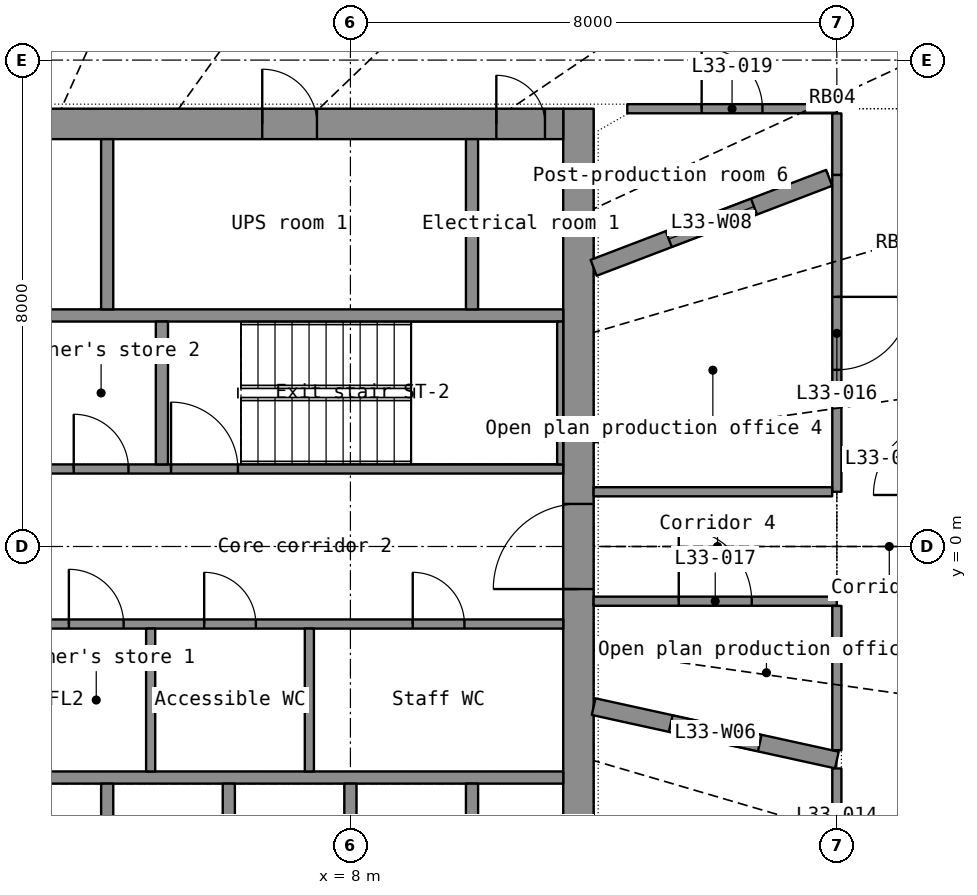
"""IFC4 building model, lengths in metres.
Left out: names, types, materials, properties, quantities, classifications, styles, units other than length and angle.
Written with IfcOpenShell. Run it as: python <this file> out.ifc"""

import sys

from ifc_helpers import new_model, si_unit, direction, frame, frame_2d, origin, place, context, subcontext, project, spatial, rectangle, extrude, element, fill, save


model = new_model("IFC4")
c1 = context("Model", 3, precision=1e-05, world=origin(), true_north=direction((0.0, 1.0)))
c2 = subcontext(c1, "Body", "Model", "MODEL_VIEW")
j1 = project(units=[si_unit("LENGTHUNIT", "METRE"), si_unit("PLANEANGLEUNIT", "RADIAN")], contexts=[c1])
p1 = place(None, origin())
s1 = spatial("IfcSite", under=j1, at=p1, CompositionType="ELEMENT")
p2 = place(p1, origin())
s2 = spatial("IfcBuilding", under=s1, at=p2, CompositionType="ELEMENT")
p3 = place(p2, frame((0.0, 0.0, 137.8)))
s3 = spatial("IfcBuildingStorey", under=s2, at=p3, CompositionType="ELEMENT", Elevation=137.8)
p4 = place(p3, frame((11.75, -7.2, 0.0), z_axis=(0.0, 0.0, 1.0), x_axis=(0.0, 1.0, 0.0)))
e1 = element("IfcWall", 1, at=p4, inside=s3, PredefinedType="SHEAR", context=c2, shape_type="SweptSolid", body=[
    extrude(rectangle(XDim=14.4, YDim=0.5, at=frame_2d((7.2, 0.0))), origin(), (0.0, 0.0, 1.0), 3.3),
])
p5 = place(p4, frame((6.5, 0.0, 0.0)))
e2 = element("IfcOpeningElement", 2, at=p5, cuts=e1, PredefinedType="OPENING", context=c2, shape_type="SweptSolid", body=[
    extrude(rectangle(XDim=1.4, YDim=2.2, at=frame_2d((0.7, 1.1))), frame((0.0, 0.26, 0.0), z_axis=(0.0, -1.0, 0.0), x_axis=(1.0, 0.0, 0.0)), (0.0, 0.0, 1.0), 0.52),
])
p6 = place(p3, frame((-11.5, 6.95, 0.0), z_axis=(0.0, 0.0, 1.0), x_axis=(1.0, 0.0, 0.0)))
e3 = element("IfcWall", 3, at=p6, inside=s3, PredefinedType="SHEAR", context=c2, shape_type="SweptSolid", body=[
    extrude(rectangle(XDim=23.0, YDim=0.5, at=frame_2d((11.5, 0.0))), origin(), (0.0, 0.0, 1.0), 3.3),
])
p7 = place(p6, frame((1.95, 0.0, 0.0)))
e4 = element("IfcOpeningElement", 4, at=p7, cuts=e3, PredefinedType="OPENING", context=c2, shape_type="SweptSolid", body=[
    extrude(rectangle(XDim=1.1, YDim=2.2, at=frame_2d((0.55, 1.1))), frame((0.0, 0.26, 0.0), z_axis=(0.0, -1.0, 0.0), x_axis=(1.0, 0.0, 0.0)), (0.0, 0.0, 1.0), 0.52),
])
p8 = place(p6, frame((10.05, 0.0, 0.0)))
e5 = element("IfcOpeningElement", 5, at=p8, cuts=e3, PredefinedType="OPENING", context=c2, shape_type="SweptSolid", body=[
    extrude(rectangle(XDim=0.9, YDim=2.1, at=frame_2d((0.45, 1.05))), frame((0.0, 0.26, 0.0), z_axis=(0.0, -1.0, 0.0), x_axis=(1.0, 0.0, 0.0)), (0.0, 0.0, 1.0), 0.52),
])
p9 = place(p6, frame((18.05, 0.0, 0.0)))
e6 = element("IfcOpeningElement", 6, at=p9, cuts=e3, PredefinedType="OPENING", context=c2, shape_type="SweptSolid", body=[
    extrude(rectangle(XDim=0.9, YDim=2.1, at=frame_2d((0.45, 1.05))), frame((0.0, 0.26, 0.0), z_axis=(0.0, -1.0, 0.0), x_axis=(1.0, 0.0, 0.0)), (0.0, 0.0, 1.0), 0.52),
])
p10 = place(p6, frame((0.3, 0.0, 0.0)))
e7 = element("IfcOpeningElement", 7, at=p10, cuts=e3, PredefinedType="OPENING", context=c2, shape_type="SweptSolid", body=[
    extrude(rectangle(XDim=0.8, YDim=2.05, at=frame_2d((0.4, 1.025))), frame((0.0, 0.26, 0.0), z_axis=(0.0, -1.0, 0.0), x_axis=(1.0, 0.0, 0.0)), (0.0, 0.0, 1.0), 0.52),
])
p11 = place(p6, frame((21.9, 0.0, 0.0)))
e8 = element("IfcOpeningElement", 8, at=p11, cuts=e3, PredefinedType="OPENING", context=c2, shape_type="SweptSolid", body=[
    extrude(rectangle(XDim=0.8, YDim=2.05, at=frame_2d((0.4, 1.025))), frame((0.0, 0.26, 0.0), z_axis=(0.0, -1.0, 0.0), x_axis=(1.0, 0.0, 0.0)), (0.0, 0.0, 1.0), 0.52),
])
for number, where, z_axis, x_axis in (
    (9, (-11.5, -3.8, 0.0), (0.0, 0.0, 1.0), (1.0, 0.0, 0.0)),
    (10, (-11.5, 3.8, 0.0), (0.0, 0.0, 1.0), (1.0, 0.0, 0.0)),
):
    element("IfcWall", number, at=place(p3, frame(where, z_axis=z_axis, x_axis=x_axis)), inside=s3, PredefinedType="SHEAR", context=c2, shape_type="SweptSolid", body=[
        extrude(rectangle(XDim=23.0, YDim=0.2, at=frame_2d((11.5, 0.0))), origin(), (0.0, 0.0, 1.0), 3.3),
    ])
for number, where, z_axis, x_axis in (
    (11, (4.0, -6.7, 0.0), (0.0, 0.0, 1.0), (0.0, 1.0, 0.0)),
    (12, (6.0, -6.7, 0.0), (0.0, 0.0, 1.0), (0.0, 1.0, 0.0)),
    (13, (8.0, -6.7, 0.0), (0.0, 0.0, 1.0), (0.0, 1.0, 0.0)),
    (14, (10.0, -6.7, 0.0), (0.0, 0.0, 1.0), (0.0, 1.0, 0.0)),
    (15, (10.0, 3.9, 0.0), (0.0, 0.0, 1.0), (0.0, 1.0, 0.0)),
):
    element("IfcWall", number, at=place(p3, frame(where, z_axis=z_axis, x_axis=x_axis)), inside=s3, PredefinedType="SHEAR", context=c2, shape_type="SweptSolid", body=[
        extrude(rectangle(XDim=2.8, YDim=0.2, at=frame_2d((1.4, 0.0))), origin(), (0.0, 0.0, 1.0), 3.3),
    ])
p12 = place(p3, frame((4.0, 3.9, 0.0), z_axis=(0.0, 0.0, 1.0), x_axis=(0.0, 1.0, 0.0)))
e16 = element("IfcWall", 16, at=p12, inside=s3, PredefinedType="PARTITIONING", context=c2, shape_type="SweptSolid", body=[
    extrude(rectangle(XDim=2.8, YDim=0.2, at=frame_2d((1.4, 0.0))), origin(), (0.0, 0.0, 1.0), 3.3),
])
p13 = place(p3, frame((3.0, -1.275, 0.0), z_axis=(0.0, 0.0, 1.0), x_axis=(1.0, 0.0, 0.0)))
e17 = element("IfcWall", 17, at=p13, inside=s3, PredefinedType="PARTITIONING", context=c2, shape_type="SweptSolid", body=[
    extrude(rectangle(XDim=8.5, YDim=0.15, at=frame_2d((4.25, 0.0))), origin(), (0.0, 0.0, 1.0), 3.3),
])
p14 = place(p13, frame((0.37, 0.0, 0.0)))
e18 = element("IfcOpeningElement", 18, at=p14, cuts=e17, PredefinedType="OPENING", context=c2, shape_type="SweptSolid", body=[
    extrude(rectangle(XDim=0.9, YDim=2.1, at=frame_2d((0.45, 1.05))), frame((0.0, 0.085, 0.0), z_axis=(0.0, -1.0, 0.0), x_axis=(1.0, 0.0, 0.0)), (0.0, 0.0, 1.0), 0.17),
])
p15 = place(p13, frame((2.595, 0.0, 0.0)))
e19 = element("IfcOpeningElement", 19, at=p15, cuts=e17, PredefinedType="OPENING", context=c2, shape_type="SweptSolid", body=[
    extrude(rectangle(XDim=0.85, YDim=2.1, at=frame_2d((0.425, 1.05))), frame((0.0, 0.085, 0.0), z_axis=(0.0, -1.0, 0.0), x_axis=(1.0, 0.0, 0.0)), (0.0, 0.0, 1.0), 0.17),
])
p16 = place(p13, frame((6.025, 0.0, 0.0)))
e20 = element("IfcOpeningElement", 20, at=p16, cuts=e17, PredefinedType="OPENING", context=c2, shape_type="SweptSolid", body=[
    extrude(rectangle(XDim=0.85, YDim=2.1, at=frame_2d((0.425, 1.05))), frame((0.0, 0.085, 0.0), z_axis=(0.0, -1.0, 0.0), x_axis=(1.0, 0.0, 0.0)), (0.0, 0.0, 1.0), 0.17),
])
p17 = place(p3, frame((3.0, 1.275, 0.0), z_axis=(0.0, 0.0, 1.0), x_axis=(1.0, 0.0, 0.0)))
e21 = element("IfcWall", 21, at=p17, inside=s3, PredefinedType="SHEAR", context=c2, shape_type="SweptSolid", body=[
    extrude(rectangle(XDim=8.5, YDim=0.15, at=frame_2d((4.25, 0.0))), origin(), (0.0, 0.0, 1.0), 3.3),
])
p18 = place(p17, frame((2.05, 0.0, 0.0)))
e22 = element("IfcOpeningElement", 22, at=p18, cuts=e21, PredefinedType="OPENING", context=c2, shape_type="SweptSolid", body=[
    extrude(rectangle(XDim=1.1, YDim=2.15, at=frame_2d((0.55, 1.075))), frame((0.0, 0.085, 0.0), z_axis=(0.0, -1.0, 0.0), x_axis=(1.0, 0.0, 0.0)), (0.0, 0.0, 1.0), 0.17),
])
p19 = place(p17, frame((0.45, 0.0, 0.0)))
e23 = element("IfcOpeningElement", 23, at=p19, cuts=e21, PredefinedType="OPENING", context=c2, shape_type="SweptSolid", body=[
    extrude(rectangle(XDim=0.9, YDim=2.1, at=frame_2d((0.45, 1.05))), frame((0.0, 0.085, 0.0), z_axis=(0.0, -1.0, 0.0), x_axis=(1.0, 0.0, 0.0)), (0.0, 0.0, 1.0), 0.17),
])
p20 = place(p3, frame((11.45, 1.35, 0.0), z_axis=(0.0, 0.0, 1.0), x_axis=(0.0, 1.0, 0.0)))
e24 = element("IfcWall", 24, at=p20, inside=s3, PredefinedType="SHEAR", context=c2, shape_type="SweptSolid", body=[
    extrude(rectangle(XDim=2.35, YDim=0.1, at=frame_2d((1.175, 0.0))), origin(), (0.0, 0.0, 1.0), 3.3),
])
p21 = place(p3, frame((4.9, 1.35, 0.0), z_axis=(0.0, 0.0, 1.0), x_axis=(0.0, 1.0, 0.0)))
e25 = element("IfcWall", 25, at=p21, inside=s3, PredefinedType="SHEAR", context=c2, shape_type="SweptSolid", body=[
    extrude(rectangle(XDim=2.35, YDim=0.2, at=frame_2d((1.175, 0.0))), origin(), (0.0, 0.0, 1.0), 3.3),
])
for number, where, z_axis, x_axis in (
    (26, (4.715, -3.7, 0.0), (0.0, 0.0, 1.0), (0.0, 1.0, 0.0)),
    (27, (7.325, -3.7, 0.0), (0.0, 0.0, 1.0), (0.0, 1.0, 0.0)),
):
    element("IfcWall", number, at=place(p3, frame(where, z_axis=z_axis, x_axis=x_axis)), inside=s3, PredefinedType="PARTITIONING", context=c2, shape_type="SweptSolid", body=[
        extrude(rectangle(XDim=2.35, YDim=0.15, at=frame_2d((1.175, 0.0))), origin(), (0.0, 0.0, 1.0), 3.3),
    ])
p22 = place(p3, frame((16.0, 6.111, 0.0), z_axis=(0.0, 0.0, 1.0), x_axis=(0.0, -1.0, 0.0)))
e28 = element("IfcWall", 28, at=p22, inside=s3, PredefinedType="PARTITIONING", context=c2, shape_type="SweptSolid", body=[
    extrude(rectangle(XDim=5.211, YDim=0.15, at=frame_2d((2.606, 0.0))), origin(), (0.0, 0.0, 1.0), 2.4),
])
p23 = place(p22, frame((2.006, 0.0, 0.0)))
e29 = element("IfcOpeningElement", 29, at=p23, cuts=e28, PredefinedType="OPENING", context=c2, shape_type="SweptSolid", body=[
    extrude(rectangle(XDim=1.2, YDim=2.2, at=frame_2d((0.6, 1.1))), frame((0.0, 0.085, 0.0), z_axis=(0.0, -1.0, 0.0), x_axis=(1.0, 0.0, 0.0)), (0.0, 0.0, 1.0), 0.17),
])
p24 = place(p3, frame((15.873, 6.063, 0.0), z_axis=(0.0, 0.0, 1.0), x_axis=(-0.934170215, -0.356827703, 0.0)))
e30 = element("IfcWall", 30, at=p24, inside=s3, PredefinedType="PARTITIONING", context=c2, shape_type="SweptSolid", body=[
    extrude(rectangle(XDim=4.146, YDim=0.28, at=frame_2d((2.073, 0.0))), origin(), (0.0, 0.0, 1.0), 2.4),
])
p25 = place(p24, frame((1.323, 0.0, 1.0)))
e31 = element("IfcOpeningElement", 31, at=p25, cuts=e30, PredefinedType="OPENING", context=c2, shape_type="SweptSolid", body=[
    extrude(rectangle(XDim=1.5, YDim=1.2, at=frame_2d((0.75, 0.6))), frame((0.0, 0.15, 0.0), z_axis=(0.0, -1.0, 0.0), x_axis=(1.0, 0.0, 0.0)), (0.0, 0.0, 1.0), 0.3),
])
p26 = place(p3, frame((16.0, -3.512, 0.0), z_axis=(0.0, 0.0, 1.0), x_axis=(-0.976750433, 0.214379551, 0.0)))
e32 = element("IfcWall", 32, at=p26, inside=s3, PredefinedType="PARTITIONING", context=c2, shape_type="SweptSolid", body=[
    extrude(rectangle(XDim=4.095, YDim=0.28, at=frame_2d((2.048, 0.0))), origin(), (0.0, 0.0, 1.0), 2.4),
])
p27 = place(p26, frame((1.298, 0.0, 1.0)))
e33 = element("IfcOpeningElement", 33, at=p27, cuts=e32, PredefinedType="OPENING", context=c2, shape_type="SweptSolid", body=[
    extrude(rectangle(XDim=1.5, YDim=1.2, at=frame_2d((0.75, 0.6))), frame((0.0, 0.15, 0.0), z_axis=(0.0, -1.0, 0.0), x_axis=(1.0, 0.0, 0.0)), (0.0, 0.0, 1.0), 0.3),
])
p28 = place(p3, frame((12.0, -0.9, 0.0), z_axis=(0.0, 0.0, 1.0), x_axis=(1.0, 0.0, 0.0)))
e34 = element("IfcWall", 34, at=p28, inside=s3, PredefinedType="PARTITIONING", context=c2, shape_type="SweptSolid", body=[
    extrude(rectangle(XDim=4.0, YDim=0.15, at=frame_2d((2.0, 0.0))), origin(), (0.0, 0.0, 1.0), 2.4),
])
p29 = place(p28, frame((1.4, 0.0, 0.0)))
e35 = element("IfcOpeningElement", 35, at=p29, cuts=e34, PredefinedType="OPENING", context=c2, shape_type="SweptSolid", body=[
    extrude(rectangle(XDim=1.2, YDim=2.2, at=frame_2d((0.6, 1.1))), frame((0.0, 0.085, 0.0), z_axis=(0.0, -1.0, 0.0), x_axis=(1.0, 0.0, 0.0)), (0.0, 0.0, 1.0), 0.17),
])
p30 = place(p3, frame((15.923, 0.9, 0.0), z_axis=(0.0, 0.0, 1.0), x_axis=(-1.0, 0.0, 0.0)))
e36 = element("IfcWall", 36, at=p30, inside=s3, PredefinedType="PARTITIONING", context=c2, shape_type="SweptSolid", body=[
    extrude(rectangle(XDim=3.923, YDim=0.15, at=frame_2d((1.961, 0.0))), origin(), (0.0, 0.0, 1.0), 2.4),
])
p31 = place(p3, frame((16.0, -3.65, 0.0), z_axis=(0.0, 0.0, 1.0), x_axis=(0.0, -1.0, 0.0)))
e37 = element("IfcWall", 37, at=p31, inside=s3, PredefinedType="PARTITIONING", context=c2, shape_type="SweptSolid", body=[
    extrude(rectangle(XDim=3.55, YDim=0.15, at=frame_2d((1.775, 0.0))), origin(), (0.0, 0.0, 1.0), 2.4),
])
p32 = place(p31, frame((1.275, 0.0, 0.0)))
e38 = element("IfcOpeningElement", 38, at=p32, cuts=e37, PredefinedType="OPENING", context=c2, shape_type="SweptSolid", body=[
    extrude(rectangle(XDim=1.0, YDim=2.2, at=frame_2d((0.5, 1.1))), frame((0.0, 0.085, 0.0), z_axis=(0.0, -1.0, 0.0), x_axis=(1.0, 0.0, 0.0)), (0.0, 0.0, 1.0), 0.17),
])
p33 = place(p3, frame((12.553, 7.2, 0.0), z_axis=(0.0, 0.0, 1.0), x_axis=(1.0, 0.0, 0.0)))
e39 = element("IfcWall", 39, at=p33, inside=s3, PredefinedType="PARTITIONING", context=c2, shape_type="SweptSolid", body=[
    extrude(rectangle(XDim=3.447, YDim=0.15, at=frame_2d((1.723, 0.0))), origin(), (0.0, 0.0, 1.0), 2.4),
])
p34 = place(p33, frame((1.223, 0.0, 0.0)))
e40 = element("IfcOpeningElement", 40, at=p34, cuts=e39, PredefinedType="OPENING", context=c2, shape_type="SweptSolid", body=[
    extrude(rectangle(XDim=1.0, YDim=2.2, at=frame_2d((0.5, 1.1))), frame((0.0, 0.085, 0.0), z_axis=(0.0, -1.0, 0.0), x_axis=(1.0, 0.0, 0.0)), (0.0, 0.0, 1.0), 0.17),
])
p35 = place(p3, frame((16.0, -0.977, 0.0), z_axis=(0.0, 0.0, 1.0), x_axis=(0.0, -1.0, 0.0)))
e41 = element("IfcWall", 41, at=p35, inside=s3, PredefinedType="PARTITIONING", context=c2, shape_type="SweptSolid", body=[
    extrude(rectangle(XDim=2.373, YDim=0.15, at=frame_2d((1.187, 0.0))), origin(), (0.0, 0.0, 1.0), 2.4),
])
p36 = place(p3, frame((16.0, 7.123, 0.0), z_axis=(0.0, 0.0, 1.0), x_axis=(0.0, -1.0, 0.0)))
e42 = element("IfcWall", 42, at=p36, inside=s3, PredefinedType="PARTITIONING", context=c2, shape_type="SweptSolid", body=[
    extrude(rectangle(XDim=1.011, YDim=0.15, at=frame_2d((0.505, 0.0))), origin(), (0.0, 0.0, 1.0), 2.4),
])
p37 = place(p9, origin())
e43 = element("IfcDoor", 43, at=p37, inside=s3, OperationType="SINGLE_SWING_LEFT", PredefinedType="DOOR", context=c2, shape_type="SweptSolid", body=[
    extrude(rectangle(XDim=0.9, YDim=2.1, at=frame_2d((0.45, 1.05))), frame((0.0, 0.025, 0.0), z_axis=(0.0, -1.0, 0.0), x_axis=(1.0, 0.0, 0.0)), (0.0, 0.0, 1.0), 0.05),
])
fill(e6, e43)
p38 = place(p11, origin())
e44 = element("IfcDoor", 44, at=p38, inside=s3, OperationType="SINGLE_SWING_LEFT", PredefinedType="DOOR", context=c2, shape_type="SweptSolid", body=[
    extrude(rectangle(XDim=0.8, YDim=2.05, at=frame_2d((0.4, 1.025))), frame((0.0, 0.025, 0.0), z_axis=(0.0, -1.0, 0.0), x_axis=(1.0, 0.0, 0.0)), (0.0, 0.0, 1.0), 0.05),
])
fill(e8, e44)
p39 = place(p5, origin())
e45 = element("IfcDoor", 45, at=p39, inside=s3, OperationType="DOUBLE_DOOR_SINGLE_SWING", PredefinedType="DOOR", context=c2, shape_type="SweptSolid", body=[
    extrude(rectangle(XDim=1.4, YDim=2.2, at=frame_2d((0.7, 1.1))), frame((0.0, 0.025, 0.0), z_axis=(0.0, -1.0, 0.0), x_axis=(1.0, 0.0, 0.0)), (0.0, 0.0, 1.0), 0.05),
])
fill(e2, e45)
p40 = place(p18, origin())
e46 = element("IfcDoor", 46, at=p40, inside=s3, OperationType="SINGLE_SWING_LEFT", PredefinedType="DOOR", context=c2, shape_type="SweptSolid", body=[
    extrude(rectangle(XDim=1.1, YDim=2.15, at=frame_2d((0.55, 1.075))), frame((0.0, 0.025, 0.0), z_axis=(0.0, -1.0, 0.0), x_axis=(1.0, 0.0, 0.0)), (0.0, 0.0, 1.0), 0.05),
])
fill(e22, e46)
p41 = place(p14, origin())
e47 = element("IfcDoor", 47, at=p41, inside=s3, OperationType="SINGLE_SWING_LEFT", PredefinedType="DOOR", context=c2, shape_type="SweptSolid", body=[
    extrude(rectangle(XDim=0.9, YDim=2.1, at=frame_2d((0.45, 1.05))), frame((0.0, 0.025, 0.0), z_axis=(0.0, -1.0, 0.0), x_axis=(1.0, 0.0, 0.0)), (0.0, 0.0, 1.0), 0.05),
])
fill(e18, e47)
p42 = place(p15, origin())
e48 = element("IfcDoor", 48, at=p42, inside=s3, OperationType="SINGLE_SWING_LEFT", PredefinedType="DOOR", context=c2, shape_type="SweptSolid", body=[
    extrude(rectangle(XDim=0.85, YDim=2.1, at=frame_2d((0.425, 1.05))), frame((0.0, 0.025, 0.0), z_axis=(0.0, -1.0, 0.0), x_axis=(1.0, 0.0, 0.0)), (0.0, 0.0, 1.0), 0.05),
])
fill(e19, e48)
p43 = place(p16, origin())
e49 = element("IfcDoor", 49, at=p43, inside=s3, OperationType="SINGLE_SWING_LEFT", PredefinedType="DOOR", context=c2, shape_type="SweptSolid", body=[
    extrude(rectangle(XDim=0.85, YDim=2.1, at=frame_2d((0.425, 1.05))), frame((0.0, 0.025, 0.0), z_axis=(0.0, -1.0, 0.0), x_axis=(1.0, 0.0, 0.0)), (0.0, 0.0, 1.0), 0.05),
])
fill(e20, e49)
p44 = place(p19, origin())
e50 = element("IfcDoor", 50, at=p44, inside=s3, OperationType="SINGLE_SWING_LEFT", PredefinedType="DOOR", context=c2, shape_type="SweptSolid", body=[
    extrude(rectangle(XDim=0.9, YDim=2.1, at=frame_2d((0.45, 1.05))), frame((0.0, 0.025, 0.0), z_axis=(0.0, -1.0, 0.0), x_axis=(1.0, 0.0, 0.0)), (0.0, 0.0, 1.0), 0.05),
])
fill(e23, e50)
p45 = place(p23, origin())
e51 = element("IfcDoor", 51, at=p45, inside=s3, OperationType="DOUBLE_DOOR_SINGLE_SWING", PredefinedType="DOOR", context=c2, shape_type="SweptSolid", body=[
    extrude(rectangle(XDim=1.2, YDim=2.2, at=frame_2d((0.6, 1.1))), frame((0.0, 0.025, 0.0), z_axis=(0.0, -1.0, 0.0), x_axis=(1.0, 0.0, 0.0)), (0.0, 0.0, 1.0), 0.05),
])
fill(e29, e51)
p46 = place(p29, origin())
e52 = element("IfcDoor", 52, at=p46, inside=s3, OperationType="DOUBLE_DOOR_SINGLE_SWING", PredefinedType="DOOR", context=c2, shape_type="SweptSolid", body=[
    extrude(rectangle(XDim=1.2, YDim=2.2, at=frame_2d((0.6, 1.1))), frame((0.0, 0.025, 0.0), z_axis=(0.0, -1.0, 0.0), x_axis=(1.0, 0.0, 0.0)), (0.0, 0.0, 1.0), 0.05),
])
fill(e35, e52)
p47 = place(p34, origin())
e53 = element("IfcDoor", 53, at=p47, inside=s3, OperationType="SINGLE_SWING_LEFT", PredefinedType="DOOR", context=c2, shape_type="SweptSolid", body=[
    extrude(rectangle(XDim=1.0, YDim=2.2, at=frame_2d((0.5, 1.1))), frame((0.0, 0.025, 0.0), z_axis=(0.0, -1.0, 0.0), x_axis=(1.0, 0.0, 0.0)), (0.0, 0.0, 1.0), 0.05),
])
fill(e40, e53)
p48 = place(p27, origin())
e54 = element("IfcWindow", 54, at=p48, inside=s3, PartitioningType="SINGLE_PANEL", PredefinedType="WINDOW", context=c2, shape_type="SweptSolid", body=[
    extrude(rectangle(XDim=1.5, YDim=1.2, at=frame_2d((0.75, 0.6))), frame((0.0, 0.03, 0.0), z_axis=(0.0, -1.0, 0.0), x_axis=(1.0, 0.0, 0.0)), (0.0, 0.0, 1.0), 0.06),
])
fill(e33, e54)
p49 = place(p25, origin())
e55 = element("IfcWindow", 55, at=p49, inside=s3, PartitioningType="SINGLE_PANEL", PredefinedType="WINDOW", context=c2, shape_type="SweptSolid", body=[
    extrude(rectangle(XDim=1.5, YDim=1.2, at=frame_2d((0.75, 0.6))), frame((0.0, 0.03, 0.0), z_axis=(0.0, -1.0, 0.0), x_axis=(1.0, 0.0, 0.0)), (0.0, 0.0, 1.0), 0.06),
])
fill(e31, e55)
save(model, sys.argv[1])
